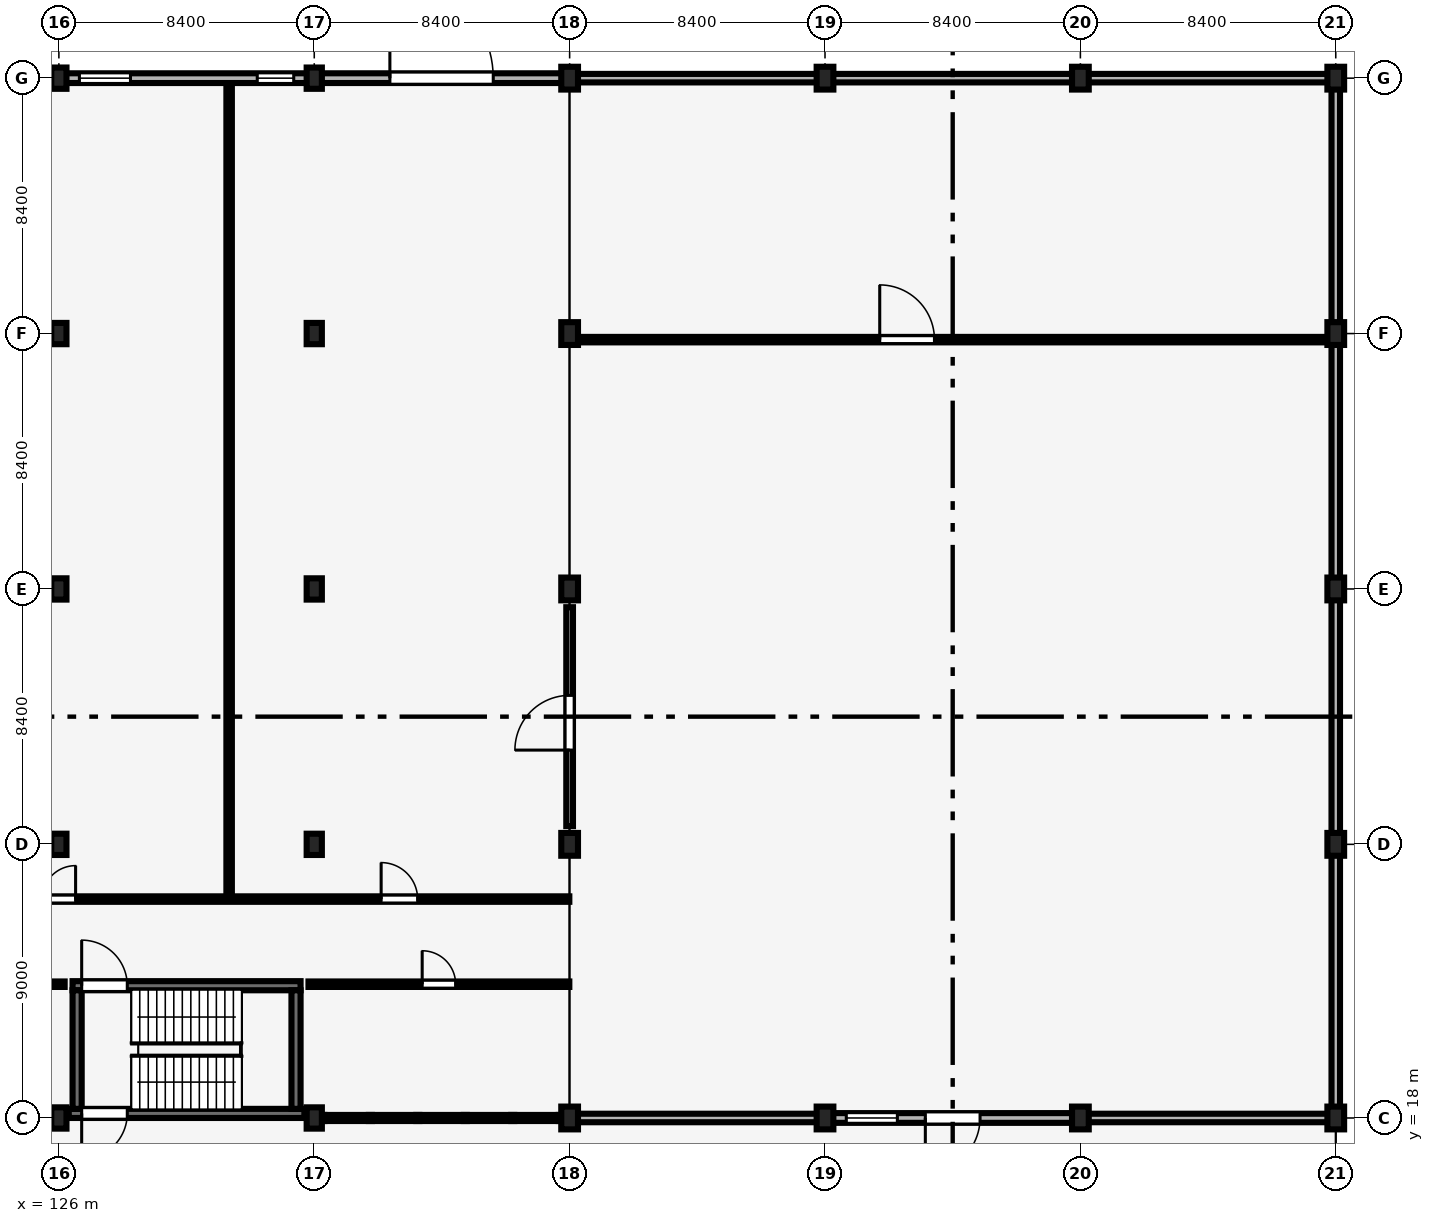
"""IFC4 building model, lengths in metres.
Left out: names, types, materials, properties, quantities, classifications, styles, units other than length and angle.
Written with IfcOpenShell. Run it as: python <this file> out.ifc"""

import sys

from ifc_helpers import new_model, si_unit, direction, frame, frame_2d, origin, origin_2d, place, context, subcontext, project, spatial, rectangle, extrude, element, fill, save


model = new_model("IFC4")
c1 = context("Model", 3, precision=1e-05, world=origin(), true_north=direction((0.0, 1.0)))
c2 = subcontext(c1, "Body", "Model", "MODEL_VIEW")
j1 = project(units=[si_unit("LENGTHUNIT", "METRE"), si_unit("PLANEANGLEUNIT", "RADIAN")], contexts=[c1])
p1 = place(None, origin())
s1 = spatial("IfcSite", under=j1, at=p1, CompositionType="ELEMENT")
p2 = place(p1, origin())
s2 = spatial("IfcBuilding", under=s1, at=p2, CompositionType="ELEMENT")
p3 = place(p2, origin())
s3 = spatial("IfcBuildingStorey", under=s2, at=p3, CompositionType="ELEMENT", Elevation=0.0)
for number, where, z_axis, x_axis in (
    (1, (126.0, 18.0, 0.0), (0.0, 0.0, 1.0), (1.0, 0.0, 0.0)),
    (2, (126.0, 27.0, 0.0), (0.0, 0.0, 1.0), (1.0, 0.0, 0.0)),
    (3, (126.0, 35.4, 0.0), (0.0, 0.0, 1.0), (1.0, 0.0, 0.0)),
    (4, (126.0, 43.8, 0.0), (0.0, 0.0, 1.0), (1.0, 0.0, 0.0)),
    (5, (126.0, 52.2, 0.0), (0.0, 0.0, 1.0), (1.0, 0.0, 0.0)),
    (6, (134.4, 18.0, 0.0), (0.0, 0.0, 1.0), (1.0, 0.0, 0.0)),
    (7, (134.4, 27.0, 0.0), (0.0, 0.0, 1.0), (1.0, 0.0, 0.0)),
    (8, (134.4, 35.4, 0.0), (0.0, 0.0, 1.0), (1.0, 0.0, 0.0)),
    (9, (134.4, 43.8, 0.0), (0.0, 0.0, 1.0), (1.0, 0.0, 0.0)),
    (10, (134.4, 52.2, 0.0), (0.0, 0.0, 1.0), (1.0, 0.0, 0.0)),
):
    element("IfcColumn", number, at=place(p3, frame(where, z_axis=z_axis, x_axis=x_axis)), inside=s3, PredefinedType="COLUMN", context=c2, shape_type="SweptSolid", body=[
        extrude(rectangle(XDim=0.5, YDim=0.7, at=origin_2d()), origin(), (0.0, 0.0, 1.0), 4.8),
    ])
for number, where, z_axis, x_axis in (
    (11, (142.8, 18.0, 0.0), (0.0, 0.0, 1.0), (1.0, 0.0, 0.0)),
    (12, (142.8, 27.0, 0.0), (0.0, 0.0, 1.0), (1.0, 0.0, 0.0)),
    (13, (142.8, 35.4, 0.0), (0.0, 0.0, 1.0), (1.0, 0.0, 0.0)),
    (14, (142.8, 43.8, 0.0), (0.0, 0.0, 1.0), (1.0, 0.0, 0.0)),
    (15, (142.8, 52.2, 0.0), (0.0, 0.0, 1.0), (1.0, 0.0, 0.0)),
    (16, (151.2, 18.0, 0.0), (0.0, 0.0, 1.0), (1.0, 0.0, 0.0)),
    (17, (151.2, 52.2, 0.0), (0.0, 0.0, 1.0), (1.0, 0.0, 0.0)),
    (18, (159.6, 18.0, 0.0), (0.0, 0.0, 1.0), (1.0, 0.0, 0.0)),
    (19, (159.6, 52.2, 0.0), (0.0, 0.0, 1.0), (1.0, 0.0, 0.0)),
    (20, (168.0, 18.0, 0.0), (0.0, 0.0, 1.0), (1.0, 0.0, 0.0)),
    (21, (168.0, 27.0, 0.0), (0.0, 0.0, 1.0), (1.0, 0.0, 0.0)),
    (22, (168.0, 35.4, 0.0), (0.0, 0.0, 1.0), (1.0, 0.0, 0.0)),
    (23, (168.0, 43.8, 0.0), (0.0, 0.0, 1.0), (1.0, 0.0, 0.0)),
    (24, (168.0, 52.2, 0.0), (0.0, 0.0, 1.0), (1.0, 0.0, 0.0)),
):
    element("IfcColumn", number, at=place(p3, frame(where, z_axis=z_axis, x_axis=x_axis)), inside=s3, PredefinedType="COLUMN", context=c2, shape_type="SweptSolid", body=[
        extrude(rectangle(XDim=0.55, YDim=0.75, at=origin_2d()), origin(), (0.0, 0.0, 1.0), 4.8),
    ])
p4 = place(p3, frame((143.05, 18.0, 0.0), z_axis=(0.0, 0.0, 1.0), x_axis=(1.0, 0.0, 0.0)))
e25 = element("IfcWall", 25, at=p4, inside=s3, PredefinedType="SOLIDWALL", context=c2, shape_type="SweptSolid", body=[
    extrude(rectangle(XDim=7.9, YDim=0.28, at=frame_2d((3.95, 0.0))), origin(), (0.0, 0.0, 1.0), 4.267),
])
p5 = place(p3, frame((151.45, 18.0, 0.0), z_axis=(0.0, 0.0, 1.0), x_axis=(1.0, 0.0, 0.0)))
e26 = element("IfcWall", 26, at=p5, inside=s3, PredefinedType="SOLIDWALL", context=c2, shape_type="SweptSolid", body=[
    extrude(rectangle(XDim=7.9, YDim=0.32, at=frame_2d((3.95, 0.0))), origin(), (0.0, 0.0, 1.0), 4.267),
])
p6 = place(p5, frame((4.85, 0.0, 0.0), z_axis=(0.0, 0.0, 1.0), x_axis=(-1.0, 0.0, 0.0)))
e27 = element("IfcOpeningElement", 27, at=p6, cuts=e26, PredefinedType="OPENING", context=c2, shape_type="SweptSolid", body=[
    extrude(rectangle(XDim=1.8, YDim=2.35, at=frame_2d((0.9, 1.175))), frame((0.0, 0.17, 0.0), z_axis=(0.0, -1.0, 0.0), x_axis=(1.0, 0.0, 0.0)), (0.0, 0.0, 1.0), 0.34),
])
p7 = place(p5, frame((0.45, 0.0, 0.95)))
e28 = element("IfcOpeningElement", 28, at=p7, cuts=e26, PredefinedType="OPENING", context=c2, shape_type="SweptSolid", body=[
    extrude(rectangle(XDim=1.68, YDim=1.8, at=frame_2d((0.84, 0.9))), frame((0.0, 0.17, 0.0), z_axis=(0.0, -1.0, 0.0), x_axis=(1.0, 0.0, 0.0)), (0.0, 0.0, 1.0), 0.34),
])
p8 = place(p3, frame((159.85, 18.0, 0.0), z_axis=(0.0, 0.0, 1.0), x_axis=(1.0, 0.0, 0.0)))
e29 = element("IfcWall", 29, at=p8, inside=s3, PredefinedType="SOLIDWALL", context=c2, shape_type="SweptSolid", body=[
    extrude(rectangle(XDim=7.9, YDim=0.28, at=frame_2d((3.95, 0.0))), origin(), (0.0, 0.0, 1.0), 4.267),
])
p9 = place(p3, frame((168.0, 18.35, 0.0), z_axis=(0.0, 0.0, 1.0), x_axis=(0.0, 1.0, 0.0)))
e30 = element("IfcWall", 30, at=p9, inside=s3, PredefinedType="SOLIDWALL", context=c2, shape_type="SweptSolid", body=[
    extrude(rectangle(XDim=8.3, YDim=0.28, at=frame_2d((4.15, 0.0))), origin(), (0.0, 0.0, 1.0), 4.267),
])
for number, where, z_axis, x_axis in (
    (31, (168.0, 27.35, 0.0), (0.0, 0.0, 1.0), (0.0, 1.0, 0.0)),
    (32, (168.0, 35.75, 0.0), (0.0, 0.0, 1.0), (0.0, 1.0, 0.0)),
):
    element("IfcWall", number, at=place(p3, frame(where, z_axis=z_axis, x_axis=x_axis)), inside=s3, PredefinedType="SOLIDWALL", context=c2, shape_type="SweptSolid", body=[
        extrude(rectangle(XDim=7.7, YDim=0.28, at=frame_2d((3.85, 0.0))), origin(), (0.0, 0.0, 1.0), 4.267),
    ])
p10 = place(p3, frame((168.0, 44.15, 0.0), z_axis=(0.0, 0.0, 1.0), x_axis=(0.0, 1.0, 0.0)))
e33 = element("IfcWall", 33, at=p10, inside=s3, PredefinedType="SOLIDWALL", context=c2, shape_type="SweptSolid", body=[
    extrude(rectangle(XDim=7.7, YDim=0.28, at=frame_2d((3.85, 0.0))), origin(), (0.0, 0.0, 1.0), 4.267),
])
p11 = place(p3, frame((143.05, 52.2, 0.0), z_axis=(0.0, 0.0, 1.0), x_axis=(1.0, 0.0, 0.0)))
e34 = element("IfcWall", 34, at=p11, inside=s3, PredefinedType="SOLIDWALL", context=c2, shape_type="SweptSolid", body=[
    extrude(rectangle(XDim=7.9, YDim=0.28, at=frame_2d((3.95, 0.0))), origin(), (0.0, 0.0, 1.0), 4.267),
])
p12 = place(p3, frame((151.45, 52.2, 0.0), z_axis=(0.0, 0.0, 1.0), x_axis=(1.0, 0.0, 0.0)))
e35 = element("IfcWall", 35, at=p12, inside=s3, PredefinedType="SOLIDWALL", context=c2, shape_type="SweptSolid", body=[
    extrude(rectangle(XDim=7.9, YDim=0.28, at=frame_2d((3.95, 0.0))), origin(), (0.0, 0.0, 1.0), 4.267),
])
p13 = place(p3, frame((159.85, 52.2, 0.0), z_axis=(0.0, 0.0, 1.0), x_axis=(1.0, 0.0, 0.0)))
e36 = element("IfcWall", 36, at=p13, inside=s3, PredefinedType="SOLIDWALL", context=c2, shape_type="SweptSolid", body=[
    extrude(rectangle(XDim=7.9, YDim=0.28, at=frame_2d((3.95, 0.0))), origin(), (0.0, 0.0, 1.0), 4.267),
])
p14 = place(p3, frame((126.225, 52.2, 0.0), z_axis=(0.0, 0.0, 1.0), x_axis=(1.0, 0.0, 0.0)))
e37 = element("IfcWall", 37, at=p14, inside=s3, PredefinedType="SOLIDWALL", context=c2, shape_type="SweptSolid", body=[
    extrude(rectangle(XDim=7.95, YDim=0.32, at=frame_2d((3.975, 0.0))), origin(), (0.0, 0.0, 1.0), 4.03),
])
p15 = place(p14, frame((0.45, 0.0, 0.9)))
e38 = element("IfcOpeningElement", 38, at=p15, cuts=e37, PredefinedType="OPENING", context=c2, shape_type="SweptSolid", body=[
    extrude(rectangle(XDim=1.68, YDim=2.4, at=frame_2d((0.84, 1.2))), frame((0.0, 0.17, 0.0), z_axis=(0.0, -1.0, 0.0), x_axis=(1.0, 0.0, 0.0)), (0.0, 0.0, 1.0), 0.34),
])
p16 = place(p14, frame((6.3, 0.0, 0.9)))
e39 = element("IfcOpeningElement", 39, at=p16, cuts=e37, PredefinedType="OPENING", context=c2, shape_type="SweptSolid", body=[
    extrude(rectangle(XDim=1.2, YDim=1.5, at=frame_2d((0.6, 0.75))), frame((0.0, 0.17, 0.0), z_axis=(0.0, -1.0, 0.0), x_axis=(1.0, 0.0, 0.0)), (0.0, 0.0, 1.0), 0.34),
])
p17 = place(p3, frame((134.625, 52.2, 0.0), z_axis=(0.0, 0.0, 1.0), x_axis=(1.0, 0.0, 0.0)))
e40 = element("IfcWall", 40, at=p17, inside=s3, PredefinedType="SOLIDWALL", context=c2, shape_type="SweptSolid", body=[
    extrude(rectangle(XDim=7.925, YDim=0.32, at=frame_2d((3.962, 0.0))), origin(), (0.0, 0.0, 1.0), 4.08),
])
p18 = place(p17, frame((2.262, 0.0, 0.0)))
e41 = element("IfcOpeningElement", 41, at=p18, cuts=e40, PredefinedType="OPENING", context=c2, shape_type="SweptSolid", body=[
    extrude(rectangle(XDim=3.4, YDim=3.2, at=frame_2d((1.7, 1.6))), frame((0.0, 0.17, 0.0), z_axis=(0.0, -1.0, 0.0), x_axis=(1.0, 0.0, 0.0)), (0.0, 0.0, 1.0), 0.34),
])
p19 = place(p3, frame((126.325, 18.15, 0.0), z_axis=(0.0, 0.0, 1.0), x_axis=(1.0, 0.0, 0.0)))
e42 = element("IfcWall", 42, at=p19, inside=s3, PredefinedType="SHEAR", context=c2, shape_type="SweptSolid", body=[
    extrude(rectangle(XDim=7.75, YDim=0.3, at=frame_2d((3.875, 0.0))), origin(), (0.0, 0.0, 1.0), 4.625),
])
p20 = place(p19, frame((1.925, 0.0, 0.0), z_axis=(0.0, 0.0, 1.0), x_axis=(-1.0, 0.0, 0.0)))
e43 = element("IfcOpeningElement", 43, at=p20, cuts=e42, PredefinedType="OPENING", context=c2, shape_type="SweptSolid", body=[
    extrude(rectangle(XDim=1.5, YDim=2.2, at=frame_2d((0.75, 1.1))), frame((0.0, 0.16, 0.0), z_axis=(0.0, -1.0, 0.0), x_axis=(1.0, 0.0, 0.0)), (0.0, 0.0, 1.0), 0.32),
])
p21 = place(p3, frame((126.45, 22.35, 0.0), z_axis=(0.0, 0.0, 1.0), x_axis=(1.0, 0.0, 0.0)))
e44 = element("IfcWall", 44, at=p21, inside=s3, PredefinedType="SHEAR", context=c2, shape_type="SweptSolid", body=[
    extrude(rectangle(XDim=7.5, YDim=0.3, at=frame_2d((3.75, 0.0))), origin(), (0.0, 0.0, 1.0), 4.625),
])
p22 = place(p21, frame((0.3, 0.0, 0.0)))
e45 = element("IfcOpeningElement", 45, at=p22, cuts=e44, PredefinedType="OPENING", context=c2, shape_type="SweptSolid", body=[
    extrude(rectangle(XDim=1.5, YDim=2.2, at=frame_2d((0.75, 1.1))), frame((0.0, 0.16, 0.0), z_axis=(0.0, -1.0, 0.0), x_axis=(1.0, 0.0, 0.0)), (0.0, 0.0, 1.0), 0.32),
])
for number, where, z_axis, x_axis in (
    (46, (126.6, 18.3, 0.0), (0.0, 0.0, 1.0), (0.0, 1.0, 0.0)),
    (47, (133.8, 18.3, 0.0), (0.0, 0.0, 1.0), (0.0, 1.0, 0.0)),
):
    element("IfcWall", number, at=place(p3, frame(where, z_axis=z_axis, x_axis=x_axis)), inside=s3, PredefinedType="SHEAR", context=c2, shape_type="SweptSolid", body=[
        extrude(rectangle(XDim=3.9, YDim=0.3, at=frame_2d((1.95, 0.0))), origin(), (0.0, 0.0, 1.0), 4.625),
    ])
p23 = place(p3, frame((131.6, 25.295, 0.0), z_axis=(0.0, 0.0, 1.0), x_axis=(0.0, 1.0, 0.0)))
e48 = element("IfcWall", 48, at=p23, inside=s3, PredefinedType="PARTITIONING", context=c2, shape_type="SweptSolid", body=[
    extrude(rectangle(XDim=26.74, YDim=0.18, at=frame_2d((13.37, 0.0))), origin(), (0.0, 0.0, 1.0), 4.5),
])
p24 = place(p3, frame((109.21, 25.2, 0.0), z_axis=(0.0, 0.0, 1.0), x_axis=(1.0, 0.0, 0.0)))
e49 = element("IfcWall", 49, at=p24, inside=s3, PredefinedType="PARTITIONING", context=c2, shape_type="SweptSolid", body=[
    extrude(rectangle(XDim=33.58, YDim=0.18, at=frame_2d((16.79, 0.0))), origin(), (0.0, 0.0, 1.0), 4.5),
])
p25 = place(p24, frame((5.04, 0.0, 0.0)))
e50 = element("IfcOpeningElement", 50, at=p25, cuts=e49, PredefinedType="OPENING", context=c2, shape_type="SweptSolid", body=[
    extrude(rectangle(XDim=1.1, YDim=2.3, at=frame_2d((0.55, 1.15))), frame((0.0, 0.1, 0.0), z_axis=(0.0, -1.0, 0.0), x_axis=(1.0, 0.0, 0.0)), (0.0, 0.0, 1.0), 0.2),
])
p26 = place(p24, frame((16.24, 0.0, 0.0)))
e51 = element("IfcOpeningElement", 51, at=p26, cuts=e49, PredefinedType="OPENING", context=c2, shape_type="SweptSolid", body=[
    extrude(rectangle(XDim=1.1, YDim=2.3, at=frame_2d((0.55, 1.15))), frame((0.0, 0.1, 0.0), z_axis=(0.0, -1.0, 0.0), x_axis=(1.0, 0.0, 0.0)), (0.0, 0.0, 1.0), 0.2),
])
p27 = place(p24, frame((27.39, 0.0, 0.0)))
e52 = element("IfcOpeningElement", 52, at=p27, cuts=e49, PredefinedType="OPENING", context=c2, shape_type="SweptSolid", body=[
    extrude(rectangle(XDim=1.2, YDim=2.4, at=frame_2d((0.6, 1.2))), frame((0.0, 0.1, 0.0), z_axis=(0.0, -1.0, 0.0), x_axis=(1.0, 0.0, 0.0)), (0.0, 0.0, 1.0), 0.2),
])
p28 = place(p3, frame((109.21, 22.4, 0.0), z_axis=(0.0, 0.0, 1.0), x_axis=(1.0, 0.0, 0.0)))
e53 = element("IfcWall", 53, at=p28, inside=s3, PredefinedType="PARTITIONING", context=c2, shape_type="SweptSolid", body=[
    extrude(rectangle(XDim=16.98, YDim=0.18, at=frame_2d((8.49, 0.0))), origin(), (0.0, 0.0, 1.0), 4.5),
])
p29 = place(p28, frame((3.54, 0.0, 0.0)))
e54 = element("IfcOpeningElement", 54, at=p29, cuts=e53, PredefinedType="OPENING", context=c2, shape_type="SweptSolid", body=[
    extrude(rectangle(XDim=1.1, YDim=2.3, at=frame_2d((0.55, 1.15))), frame((0.0, 0.1, 0.0), z_axis=(0.0, -1.0, 0.0), x_axis=(1.0, 0.0, 0.0)), (0.0, 0.0, 1.0), 0.2),
])
p30 = place(p28, frame((11.74, 0.0, 0.0)))
e55 = element("IfcOpeningElement", 55, at=p30, cuts=e53, PredefinedType="OPENING", context=c2, shape_type="SweptSolid", body=[
    extrude(rectangle(XDim=1.7, YDim=2.25, at=frame_2d((0.85, 1.125))), frame((0.0, 0.1, 0.0), z_axis=(0.0, -1.0, 0.0), x_axis=(1.0, 0.0, 0.0)), (0.0, 0.0, 1.0), 0.2),
])
p31 = place(p3, frame((134.21, 22.4, 0.0), z_axis=(0.0, 0.0, 1.0), x_axis=(1.0, 0.0, 0.0)))
e56 = element("IfcWall", 56, at=p31, inside=s3, PredefinedType="PARTITIONING", context=c2, shape_type="SweptSolid", body=[
    extrude(rectangle(XDim=8.58, YDim=0.18, at=frame_2d((4.29, 0.0))), origin(), (0.0, 0.0, 1.0), 4.5),
])
p32 = place(p31, frame((3.74, 0.0, 0.0)))
e57 = element("IfcOpeningElement", 57, at=p32, cuts=e56, PredefinedType="OPENING", context=c2, shape_type="SweptSolid", body=[
    extrude(rectangle(XDim=1.1, YDim=2.3, at=frame_2d((0.55, 1.15))), frame((0.0, 0.1, 0.0), z_axis=(0.0, -1.0, 0.0), x_axis=(1.0, 0.0, 0.0)), (0.0, 0.0, 1.0), 0.2),
])
p33 = place(p3, frame((143.085, 43.6, 0.0), z_axis=(0.0, 0.0, 1.0), x_axis=(1.0, 0.0, 0.0)))
e58 = element("IfcWall", 58, at=p33, inside=s3, PredefinedType="PARTITIONING", context=c2, shape_type="SweptSolid", body=[
    extrude(rectangle(XDim=24.77, YDim=0.18, at=frame_2d((12.385, 0.0))), origin(), (0.0, 0.0, 1.0), 4.5),
])
p34 = place(p33, frame((9.915, 0.0, 0.0)))
e59 = element("IfcOpeningElement", 59, at=p34, cuts=e58, PredefinedType="OPENING", context=c2, shape_type="SweptSolid", body=[
    extrude(rectangle(XDim=1.8, YDim=2.4, at=frame_2d((0.9, 1.2))), frame((0.0, 0.1, 0.0), z_axis=(0.0, -1.0, 0.0), x_axis=(1.0, 0.0, 0.0)), (0.0, 0.0, 1.0), 0.2),
])
p35 = place(p3, frame((142.8, 27.6, 0.0), z_axis=(0.0, 0.0, 1.0), x_axis=(0.0, 1.0, 0.0)))
e60 = element("IfcWall", 60, at=p35, inside=s3, PredefinedType="SOLIDWALL", context=c2, shape_type="SweptSolid", body=[
    extrude(rectangle(XDim=7.2, YDim=0.22, at=frame_2d((3.6, 0.0))), origin(), (0.0, 0.0, 1.0), 3.72),
])
p36 = place(p35, frame((2.5, 0.0, 0.0)))
e61 = element("IfcOpeningElement", 61, at=p36, cuts=e60, PredefinedType="OPENING", context=c2, shape_type="SweptSolid", body=[
    extrude(rectangle(XDim=1.8, YDim=2.4, at=frame_2d((0.9, 1.2))), frame((0.0, 0.12, 0.0), z_axis=(0.0, -1.0, 0.0), x_axis=(1.0, 0.0, 0.0)), (0.0, 0.0, 1.0), 0.24),
])
p37 = place(p6, origin())
e62 = element("IfcDoor", 62, at=p37, inside=s3, OperationType="DOUBLE_DOOR_SINGLE_SWING", PredefinedType="DOOR", context=c2, shape_type="SweptSolid", body=[
    extrude(rectangle(XDim=1.8, YDim=2.35, at=frame_2d((0.9, 1.175))), frame((0.0, 0.025, 0.0), z_axis=(0.0, -1.0, 0.0), x_axis=(1.0, 0.0, 0.0)), (0.0, 0.0, 1.0), 0.05),
])
fill(e27, e62)
p38 = place(p7, origin())
e63 = element("IfcWindow", 63, at=p38, inside=s3, PartitioningType="SINGLE_PANEL", PredefinedType="WINDOW", context=c2, shape_type="SweptSolid", body=[
    extrude(rectangle(XDim=1.68, YDim=1.8, at=frame_2d((0.84, 0.9))), frame((0.0, 0.03, 0.0), z_axis=(0.0, -1.0, 0.0), x_axis=(1.0, 0.0, 0.0)), (0.0, 0.0, 1.0), 0.06),
])
fill(e28, e63)
p39 = place(p15, origin())
e64 = element("IfcWindow", 64, at=p39, inside=s3, PartitioningType="SINGLE_PANEL", PredefinedType="WINDOW", context=c2, shape_type="SweptSolid", body=[
    extrude(rectangle(XDim=1.68, YDim=2.4, at=frame_2d((0.84, 1.2))), frame((0.0, 0.03, 0.0), z_axis=(0.0, -1.0, 0.0), x_axis=(1.0, 0.0, 0.0)), (0.0, 0.0, 1.0), 0.06),
])
fill(e38, e64)
p40 = place(p16, origin())
e65 = element("IfcWindow", 65, at=p40, inside=s3, PartitioningType="SINGLE_PANEL", PredefinedType="WINDOW", context=c2, shape_type="SweptSolid", body=[
    extrude(rectangle(XDim=1.2, YDim=1.5, at=frame_2d((0.6, 0.75))), frame((0.0, 0.03, 0.0), z_axis=(0.0, -1.0, 0.0), x_axis=(1.0, 0.0, 0.0)), (0.0, 0.0, 1.0), 0.06),
])
fill(e39, e65)
p41 = place(p18, origin())
e66 = element("IfcDoor", 66, at=p41, inside=s3, OperationType="DOUBLE_DOOR_SINGLE_SWING", PredefinedType="DOOR", context=c2, shape_type="SweptSolid", body=[
    extrude(rectangle(XDim=3.4, YDim=3.2, at=frame_2d((1.7, 1.6))), frame((0.0, 0.025, 0.0), z_axis=(0.0, -1.0, 0.0), x_axis=(1.0, 0.0, 0.0)), (0.0, 0.0, 1.0), 0.05),
])
fill(e41, e66)
p42 = place(p20, origin())
e67 = element("IfcDoor", 67, at=p42, inside=s3, OperationType="DOUBLE_DOOR_SINGLE_SWING", PredefinedType="DOOR", context=c2, shape_type="SweptSolid", body=[
    extrude(rectangle(XDim=1.5, YDim=2.2, at=frame_2d((0.75, 1.1))), frame((0.0, 0.025, 0.0), z_axis=(0.0, -1.0, 0.0), x_axis=(1.0, 0.0, 0.0)), (0.0, 0.0, 1.0), 0.05),
])
fill(e43, e67)
p43 = place(p22, origin())
e68 = element("IfcDoor", 68, at=p43, inside=s3, OperationType="DOUBLE_DOOR_SINGLE_SWING", PredefinedType="DOOR", context=c2, shape_type="SweptSolid", body=[
    extrude(rectangle(XDim=1.5, YDim=2.2, at=frame_2d((0.75, 1.1))), frame((0.0, 0.025, 0.0), z_axis=(0.0, -1.0, 0.0), x_axis=(1.0, 0.0, 0.0)), (0.0, 0.0, 1.0), 0.05),
])
fill(e45, e68)
p44 = place(p26, origin())
e69 = element("IfcDoor", 69, at=p44, inside=s3, OperationType="SINGLE_SWING_RIGHT", PredefinedType="DOOR", context=c2, shape_type="SweptSolid", body=[
    extrude(rectangle(XDim=1.1, YDim=2.3, at=frame_2d((0.55, 1.15))), frame((0.0, 0.025, 0.0), z_axis=(0.0, -1.0, 0.0), x_axis=(1.0, 0.0, 0.0)), (0.0, 0.0, 1.0), 0.05),
])
fill(e51, e69)
p45 = place(p27, origin())
e70 = element("IfcDoor", 70, at=p45, inside=s3, OperationType="SINGLE_SWING_LEFT", PredefinedType="DOOR", context=c2, shape_type="SweptSolid", body=[
    extrude(rectangle(XDim=1.2, YDim=2.4, at=frame_2d((0.6, 1.2))), frame((0.0, 0.025, 0.0), z_axis=(0.0, -1.0, 0.0), x_axis=(1.0, 0.0, 0.0)), (0.0, 0.0, 1.0), 0.05),
])
fill(e52, e70)
p46 = place(p32, origin())
e71 = element("IfcDoor", 71, at=p46, inside=s3, OperationType="SINGLE_SWING_LEFT", PredefinedType="DOOR", context=c2, shape_type="SweptSolid", body=[
    extrude(rectangle(XDim=1.1, YDim=2.3, at=frame_2d((0.55, 1.15))), frame((0.0, 0.025, 0.0), z_axis=(0.0, -1.0, 0.0), x_axis=(1.0, 0.0, 0.0)), (0.0, 0.0, 1.0), 0.05),
])
fill(e57, e71)
p47 = place(p34, origin())
e72 = element("IfcDoor", 72, at=p47, inside=s3, OperationType="DOUBLE_DOOR_SINGLE_SWING", PredefinedType="DOOR", context=c2, shape_type="SweptSolid", body=[
    extrude(rectangle(XDim=1.8, YDim=2.4, at=frame_2d((0.9, 1.2))), frame((0.0, 0.025, 0.0), z_axis=(0.0, -1.0, 0.0), x_axis=(1.0, 0.0, 0.0)), (0.0, 0.0, 1.0), 0.05),
])
fill(e59, e72)
p48 = place(p36, origin())
e73 = element("IfcDoor", 73, at=p48, inside=s3, OperationType="DOUBLE_DOOR_SINGLE_SWING", PredefinedType="DOOR", context=c2, shape_type="SweptSolid", body=[
    extrude(rectangle(XDim=1.8, YDim=2.4, at=frame_2d((0.9, 1.2))), frame((0.0, 0.025, 0.0), z_axis=(0.0, -1.0, 0.0), x_axis=(1.0, 0.0, 0.0)), (0.0, 0.0, 1.0), 0.05),
])
fill(e61, e73)
save(model, sys.argv[1])
